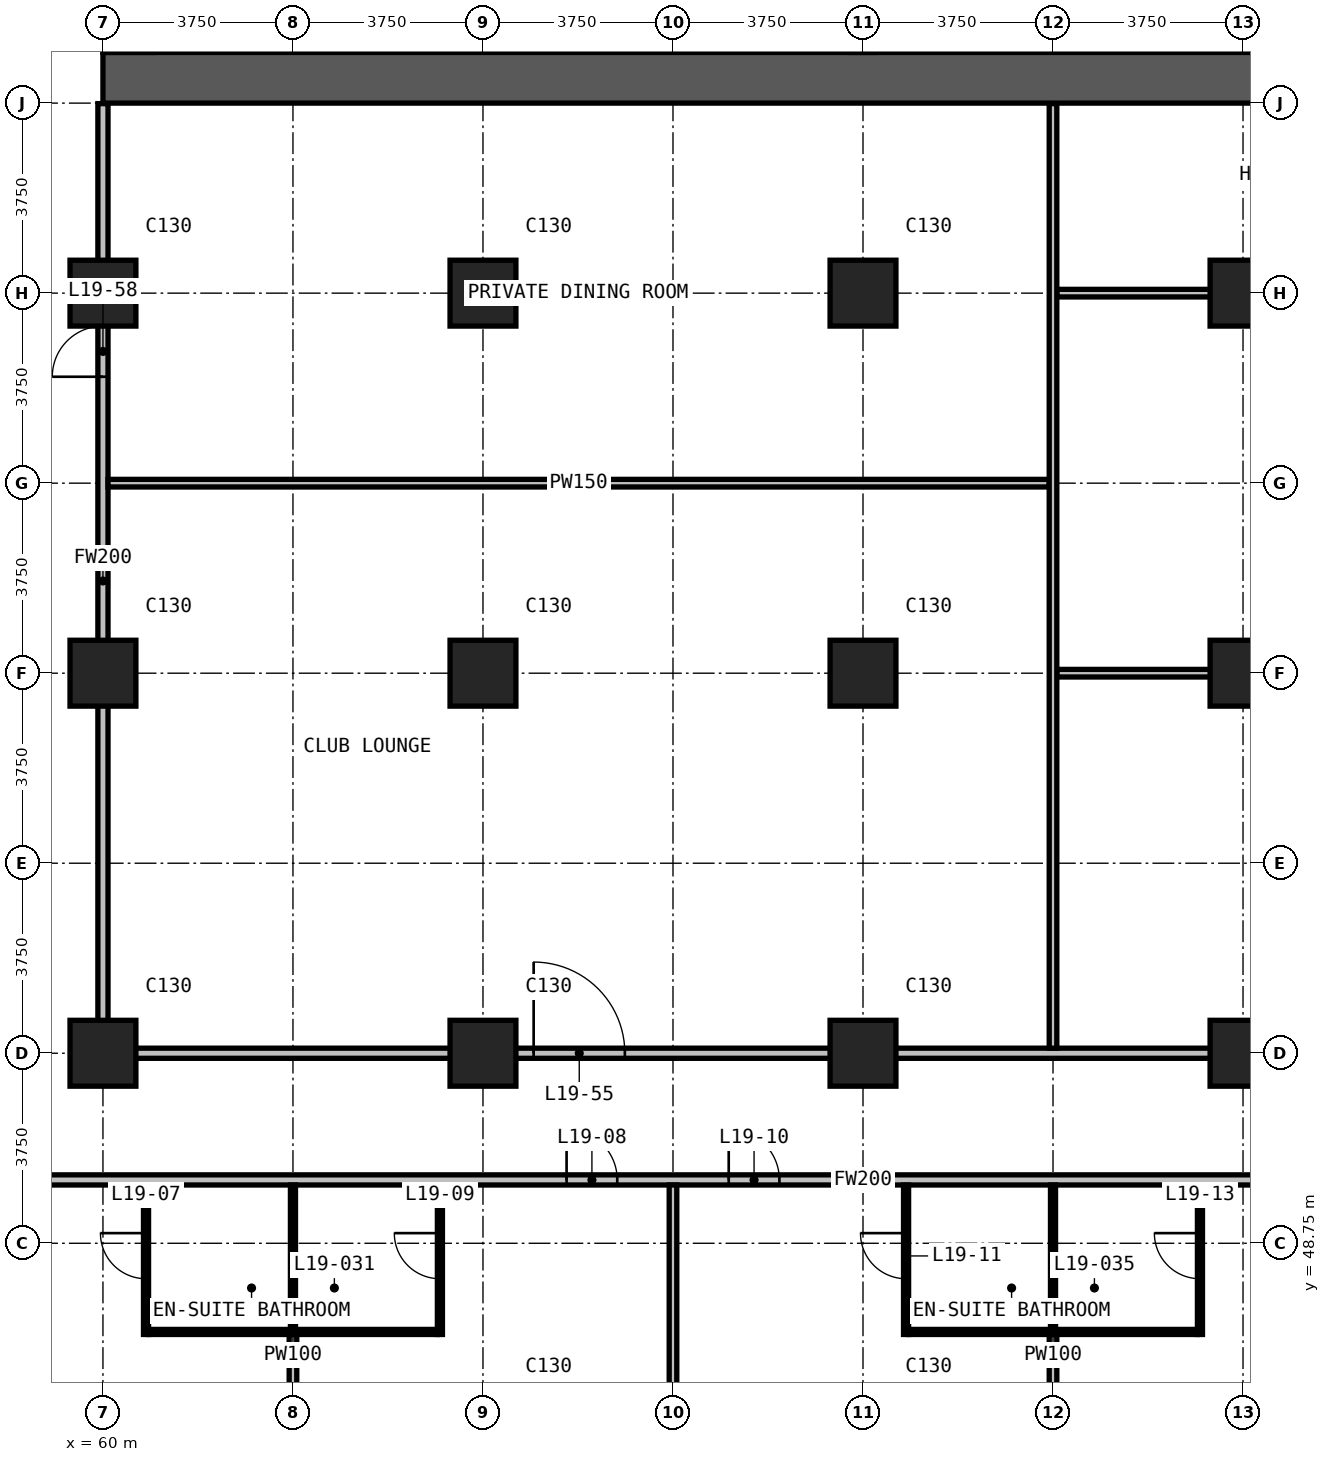
"""IFC4 building model, lengths in metres.
Left out: names, types, materials, properties, quantities, classifications, styles, units other than length and angle.
Written with IfcOpenShell. Run it as: python <this file> out.ifc"""

import sys

from ifc_helpers import new_model, si_unit, direction, frame, frame_2d, origin, origin_2d, place, context, subcontext, project, spatial, rectangle, extrude, element, fill, save


model = new_model("IFC4")
c1 = context("Model", 3, precision=1e-05, world=origin(), true_north=direction((0.0, 1.0)))
c2 = subcontext(c1, "Body", "Model", "MODEL_VIEW")
j1 = project(units=[si_unit("LENGTHUNIT", "METRE"), si_unit("PLANEANGLEUNIT", "RADIAN")], contexts=[c1])
p1 = place(None, origin())
s1 = spatial("IfcSite", under=j1, at=p1, CompositionType="ELEMENT")
p2 = place(p1, origin())
s2 = spatial("IfcBuilding", under=s1, at=p2, CompositionType="ELEMENT")
p3 = place(p2, frame((0.0, 0.0, 82.4)))
s3 = spatial("IfcBuildingStorey", under=s2, at=p3, CompositionType="ELEMENT", Elevation=82.4)
for number, where, z_axis, x_axis in (
    (1, (60.0, 52.5, 0.0), (0.0, 0.0, 1.0), (1.0, 0.0, 0.0)),
    (2, (60.0, 60.0, 0.0), (0.0, 0.0, 1.0), (1.0, 0.0, 0.0)),
    (3, (60.0, 67.5, 0.0), (0.0, 0.0, 1.0), (1.0, 0.0, 0.0)),
    (4, (67.5, 52.5, 0.0), (0.0, 0.0, 1.0), (1.0, 0.0, 0.0)),
    (5, (67.5, 60.0, 0.0), (0.0, 0.0, 1.0), (1.0, 0.0, 0.0)),
    (6, (67.5, 67.5, 0.0), (0.0, 0.0, 1.0), (1.0, 0.0, 0.0)),
    (7, (75.0, 52.5, 0.0), (0.0, 0.0, 1.0), (1.0, 0.0, 0.0)),
    (8, (75.0, 60.0, 0.0), (0.0, 0.0, 1.0), (1.0, 0.0, 0.0)),
    (9, (75.0, 67.5, 0.0), (0.0, 0.0, 1.0), (1.0, 0.0, 0.0)),
    (10, (82.5, 52.5, 0.0), (0.0, 0.0, 1.0), (1.0, 0.0, 0.0)),
    (11, (82.5, 60.0, 0.0), (0.0, 0.0, 1.0), (1.0, 0.0, 0.0)),
    (12, (82.5, 67.5, 0.0), (0.0, 0.0, 1.0), (1.0, 0.0, 0.0)),
):
    element("IfcColumn", number, at=place(p3, frame(where, z_axis=z_axis, x_axis=x_axis)), inside=s3, PredefinedType="COLUMN", context=c2, shape_type="SweptSolid", body=[
        extrude(rectangle(XDim=1.3, YDim=1.3, at=origin_2d()), origin(), (0.0, 0.0, 1.0), 3.3),
    ])
p4 = place(p3, frame((60.0, 71.75, 0.0), z_axis=(0.0, 0.0, 1.0), x_axis=(1.0, 0.0, 0.0)))
e13 = element("IfcWall", 13, at=p4, inside=s3, PredefinedType="SHEAR", context=c2, shape_type="SweptSolid", body=[
    extrude(rectangle(XDim=30.0, YDim=1.0, at=frame_2d((15.0, 0.0))), origin(), (0.0, 0.0, 1.0), 3.3),
])
p5 = place(p3, frame((51.735, 50.0, 0.0), z_axis=(0.0, 0.0, 1.0), x_axis=(1.0, 0.0, 0.0)))
e14 = element("IfcWall", 14, at=p5, inside=s3, PredefinedType="PARTITIONING", context=c2, shape_type="SweptSolid", body=[
    extrude(rectangle(XDim=46.53, YDim=0.2, at=frame_2d((23.265, 0.0))), origin(), (0.0, 0.0, 1.0), 3.0),
])
p6 = place(p5, frame((5.615, 0.0, 0.0)))
e15 = element("IfcOpeningElement", 15, at=p6, cuts=e14, PredefinedType="OPENING", context=c2, shape_type="SweptSolid", body=[
    extrude(rectangle(XDim=1.0, YDim=2.2, at=frame_2d((0.5, 1.1))), frame((0.0, 0.11, 0.0), z_axis=(0.0, -1.0, 0.0), x_axis=(1.0, 0.0, 0.0)), (0.0, 0.0, 1.0), 0.22),
])
p7 = place(p5, frame((17.415, 0.0, 0.0)))
e16 = element("IfcOpeningElement", 16, at=p7, cuts=e14, PredefinedType="OPENING", context=c2, shape_type="SweptSolid", body=[
    extrude(rectangle(XDim=1.0, YDim=2.2, at=frame_2d((0.5, 1.1))), frame((0.0, 0.11, 0.0), z_axis=(0.0, -1.0, 0.0), x_axis=(1.0, 0.0, 0.0)), (0.0, 0.0, 1.0), 0.22),
])
p8 = place(p5, frame((20.615, 0.0, 0.0)))
e17 = element("IfcOpeningElement", 17, at=p8, cuts=e14, PredefinedType="OPENING", context=c2, shape_type="SweptSolid", body=[
    extrude(rectangle(XDim=1.0, YDim=2.2, at=frame_2d((0.5, 1.1))), frame((0.0, 0.11, 0.0), z_axis=(0.0, -1.0, 0.0), x_axis=(1.0, 0.0, 0.0)), (0.0, 0.0, 1.0), 0.22),
])
p9 = place(p5, frame((32.415, 0.0, 0.0)))
e18 = element("IfcOpeningElement", 18, at=p9, cuts=e14, PredefinedType="OPENING", context=c2, shape_type="SweptSolid", body=[
    extrude(rectangle(XDim=1.0, YDim=2.2, at=frame_2d((0.5, 1.1))), frame((0.0, 0.11, 0.0), z_axis=(0.0, -1.0, 0.0), x_axis=(1.0, 0.0, 0.0)), (0.0, 0.0, 1.0), 0.22),
])
p10 = place(p5, frame((35.615, 0.0, 0.0)))
e19 = element("IfcOpeningElement", 19, at=p10, cuts=e14, PredefinedType="OPENING", context=c2, shape_type="SweptSolid", body=[
    extrude(rectangle(XDim=1.0, YDim=2.2, at=frame_2d((0.5, 1.1))), frame((0.0, 0.11, 0.0), z_axis=(0.0, -1.0, 0.0), x_axis=(1.0, 0.0, 0.0)), (0.0, 0.0, 1.0), 0.22),
])
p11 = place(p5, frame((1.8, 0.0, 0.0)))
e20 = element("IfcOpeningElement", 20, at=p11, cuts=e14, PredefinedType="OPENING", context=c2, shape_type="SweptSolid", body=[
    extrude(rectangle(XDim=0.9, YDim=2.2, at=frame_2d((0.45, 1.1))), frame((0.0, 0.11, 0.0), z_axis=(0.0, -1.0, 0.0), x_axis=(1.0, 0.0, 0.0)), (0.0, 0.0, 1.0), 0.22),
])
p12 = place(p5, frame((43.815, 0.0, 0.0)))
e21 = element("IfcOpeningElement", 21, at=p12, cuts=e14, PredefinedType="OPENING", context=c2, shape_type="SweptSolid", body=[
    extrude(rectangle(XDim=0.9, YDim=2.2, at=frame_2d((0.45, 1.1))), frame((0.0, 0.11, 0.0), z_axis=(0.0, -1.0, 0.0), x_axis=(1.0, 0.0, 0.0)), (0.0, 0.0, 1.0), 0.22),
])
p13 = place(p3, frame((60.1, 52.5, 0.0), z_axis=(0.0, 0.0, 1.0), x_axis=(1.0, 0.0, 0.0)))
e22 = element("IfcWall", 22, at=p13, inside=s3, PredefinedType="PARTITIONING", context=c2, shape_type="SweptSolid", body=[
    extrude(rectangle(XDim=29.8, YDim=0.2, at=frame_2d((14.9, 0.0))), origin(), (0.0, 0.0, 1.0), 3.0),
])
p14 = place(p13, frame((8.4, 0.0, 0.0)))
e23 = element("IfcOpeningElement", 23, at=p14, cuts=e22, PredefinedType="OPENING", context=c2, shape_type="SweptSolid", body=[
    extrude(rectangle(XDim=1.8, YDim=2.2, at=frame_2d((0.9, 1.1))), frame((0.0, 0.11, 0.0), z_axis=(0.0, -1.0, 0.0), x_axis=(1.0, 0.0, 0.0)), (0.0, 0.0, 1.0), 0.22),
])
p15 = place(p13, frame((23.75, 0.0, 0.0)))
e24 = element("IfcOpeningElement", 24, at=p15, cuts=e22, PredefinedType="OPENING", context=c2, shape_type="SweptSolid", body=[
    extrude(rectangle(XDim=0.9, YDim=2.2, at=frame_2d((0.45, 1.1))), frame((0.0, 0.11, 0.0), z_axis=(0.0, -1.0, 0.0), x_axis=(1.0, 0.0, 0.0)), (0.0, 0.0, 1.0), 0.22),
])
p16 = place(p3, frame((60.0, 52.4, 0.0), z_axis=(0.0, 0.0, 1.0), x_axis=(0.0, 1.0, 0.0)))
e25 = element("IfcWall", 25, at=p16, inside=s3, PredefinedType="PARTITIONING", context=c2, shape_type="SweptSolid", body=[
    extrude(rectangle(XDim=18.84, YDim=0.2, at=frame_2d((9.42, 0.0))), origin(), (0.0, 0.0, 1.0), 3.0),
])
p17 = place(p16, frame((13.45, 0.0, 0.0)))
e26 = element("IfcOpeningElement", 26, at=p17, cuts=e25, PredefinedType="OPENING", context=c2, shape_type="SweptSolid", body=[
    extrude(rectangle(XDim=1.0, YDim=2.2, at=frame_2d((0.5, 1.1))), frame((0.0, 0.11, 0.0), z_axis=(0.0, -1.0, 0.0), x_axis=(1.0, 0.0, 0.0)), (0.0, 0.0, 1.0), 0.22),
])
p18 = place(p3, frame((78.825, 60.0, 0.0), z_axis=(0.0, 0.0, 1.0), x_axis=(1.0, 0.0, 0.0)))
e27 = element("IfcWall", 27, at=p18, inside=s3, PredefinedType="PARTITIONING", context=c2, shape_type="SweptSolid", body=[
    extrude(rectangle(XDim=11.075, YDim=0.15, at=frame_2d((5.538, 0.0))), origin(), (0.0, 0.0, 1.0), 3.0),
])
p19 = place(p3, frame((60.1, 63.75, 0.0), z_axis=(0.0, 0.0, 1.0), x_axis=(1.0, 0.0, 0.0)))
e28 = element("IfcWall", 28, at=p19, inside=s3, PredefinedType="PARTITIONING", context=c2, shape_type="SweptSolid", body=[
    extrude(rectangle(XDim=18.575, YDim=0.15, at=frame_2d((9.288, 0.0))), origin(), (0.0, 0.0, 1.0), 3.0),
])
p20 = place(p3, frame((78.825, 67.5, 0.0), z_axis=(0.0, 0.0, 1.0), x_axis=(1.0, 0.0, 0.0)))
e29 = element("IfcWall", 29, at=p20, inside=s3, PredefinedType="PARTITIONING", context=c2, shape_type="SweptSolid", body=[
    extrude(rectangle(XDim=11.075, YDim=0.15, at=frame_2d((5.538, 0.0))), origin(), (0.0, 0.0, 1.0), 3.0),
])
p21 = place(p3, frame((63.75, 40.54, 0.0), z_axis=(0.0, 0.0, 1.0), x_axis=(0.0, 1.0, 0.0)))
e30 = element("IfcWall", 30, at=p21, inside=s3, PredefinedType="PARTITIONING", context=c2, shape_type="SweptSolid", body=[
    extrude(rectangle(XDim=6.41, YDim=0.15, at=frame_2d((3.205, 0.0))), origin(), (0.0, 0.0, 1.0), 3.0),
])
p22 = place(p3, frame((71.25, 40.54, 0.0), z_axis=(0.0, 0.0, 1.0), x_axis=(0.0, 1.0, 0.0)))
e31 = element("IfcWall", 31, at=p22, inside=s3, PredefinedType="PARTITIONING", context=c2, shape_type="SweptSolid", body=[
    extrude(rectangle(XDim=9.36, YDim=0.15, at=frame_2d((4.68, 0.0))), origin(), (0.0, 0.0, 1.0), 3.0),
])
p23 = place(p3, frame((78.75, 40.485, 0.0), z_axis=(0.0, 0.0, 1.0), x_axis=(0.0, 1.0, 0.0)))
e32 = element("IfcWall", 32, at=p23, inside=s3, PredefinedType="PARTITIONING", context=c2, shape_type="SweptSolid", body=[
    extrude(rectangle(XDim=6.465, YDim=0.15, at=frame_2d((3.232, 0.0))), origin(), (0.0, 0.0, 1.0), 3.0),
])
p24 = place(p3, frame((78.75, 52.6, 0.0), z_axis=(0.0, 0.0, 1.0), x_axis=(0.0, 1.0, 0.0)))
e33 = element("IfcWall", 33, at=p24, inside=s3, PredefinedType="PARTITIONING", context=c2, shape_type="SweptSolid", body=[
    extrude(rectangle(XDim=18.64, YDim=0.15, at=frame_2d((9.32, 0.0))), origin(), (0.0, 0.0, 1.0), 3.0),
])
for number, where, z_axis, x_axis in (
    (34, (60.9, 47.0, 0.0), (0.0, 0.0, 1.0), (1.0, 0.0, 0.0)),
    (35, (75.9, 47.0, 0.0), (0.0, 0.0, 1.0), (1.0, 0.0, 0.0)),
):
    element("IfcWall", number, at=place(p3, frame(where, z_axis=z_axis, x_axis=x_axis)), inside=s3, PredefinedType="PARTITIONING", context=c2, shape_type="SweptSolid", body=[
        extrude(rectangle(XDim=5.7, YDim=0.1, at=frame_2d((2.85, 0.0))), origin(), (0.0, 0.0, 1.0), 3.0),
    ])
p25 = place(p3, frame((60.85, 46.95, 0.0), z_axis=(0.0, 0.0, 1.0), x_axis=(0.0, 1.0, 0.0)))
e36 = element("IfcWall", 36, at=p25, inside=s3, PredefinedType="PARTITIONING", context=c2, shape_type="SweptSolid", body=[
    extrude(rectangle(XDim=2.95, YDim=0.1, at=frame_2d((1.475, 0.0))), origin(), (0.0, 0.0, 1.0), 3.0),
])
p26 = place(p25, frame((1.1, 0.0, 0.0)))
e37 = element("IfcOpeningElement", 37, at=p26, cuts=e36, PredefinedType="OPENING", context=c2, shape_type="SweptSolid", body=[
    extrude(rectangle(XDim=0.9, YDim=2.2, at=frame_2d((0.45, 1.1))), frame((0.0, 0.06, 0.0), z_axis=(0.0, -1.0, 0.0), x_axis=(1.0, 0.0, 0.0)), (0.0, 0.0, 1.0), 0.12),
])
p27 = place(p3, frame((63.75, 47.05, 0.0), z_axis=(0.0, 0.0, 1.0), x_axis=(0.0, 1.0, 0.0)))
e38 = element("IfcWall", 38, at=p27, inside=s3, PredefinedType="PARTITIONING", context=c2, shape_type="SweptSolid", body=[
    extrude(rectangle(XDim=2.85, YDim=0.1, at=frame_2d((1.425, 0.0))), origin(), (0.0, 0.0, 1.0), 3.0),
])
p28 = place(p3, frame((66.65, 46.95, 0.0), z_axis=(0.0, 0.0, 1.0), x_axis=(0.0, 1.0, 0.0)))
e39 = element("IfcWall", 39, at=p28, inside=s3, PredefinedType="PARTITIONING", context=c2, shape_type="SweptSolid", body=[
    extrude(rectangle(XDim=2.95, YDim=0.1, at=frame_2d((1.475, 0.0))), origin(), (0.0, 0.0, 1.0), 3.0),
])
p29 = place(p28, frame((1.1, 0.0, 0.0)))
e40 = element("IfcOpeningElement", 40, at=p29, cuts=e39, PredefinedType="OPENING", context=c2, shape_type="SweptSolid", body=[
    extrude(rectangle(XDim=0.9, YDim=2.2, at=frame_2d((0.45, 1.1))), frame((0.0, 0.06, 0.0), z_axis=(0.0, -1.0, 0.0), x_axis=(1.0, 0.0, 0.0)), (0.0, 0.0, 1.0), 0.12),
])
p30 = place(p3, frame((75.85, 46.95, 0.0), z_axis=(0.0, 0.0, 1.0), x_axis=(0.0, 1.0, 0.0)))
e41 = element("IfcWall", 41, at=p30, inside=s3, PredefinedType="PARTITIONING", context=c2, shape_type="SweptSolid", body=[
    extrude(rectangle(XDim=2.95, YDim=0.1, at=frame_2d((1.475, 0.0))), origin(), (0.0, 0.0, 1.0), 3.0),
])
p31 = place(p30, frame((1.1, 0.0, 0.0)))
e42 = element("IfcOpeningElement", 42, at=p31, cuts=e41, PredefinedType="OPENING", context=c2, shape_type="SweptSolid", body=[
    extrude(rectangle(XDim=0.9, YDim=2.2, at=frame_2d((0.45, 1.1))), frame((0.0, 0.06, 0.0), z_axis=(0.0, -1.0, 0.0), x_axis=(1.0, 0.0, 0.0)), (0.0, 0.0, 1.0), 0.12),
])
p32 = place(p3, frame((78.75, 47.05, 0.0), z_axis=(0.0, 0.0, 1.0), x_axis=(0.0, 1.0, 0.0)))
e43 = element("IfcWall", 43, at=p32, inside=s3, PredefinedType="PARTITIONING", context=c2, shape_type="SweptSolid", body=[
    extrude(rectangle(XDim=2.85, YDim=0.1, at=frame_2d((1.425, 0.0))), origin(), (0.0, 0.0, 1.0), 3.0),
])
p33 = place(p3, frame((81.65, 46.95, 0.0), z_axis=(0.0, 0.0, 1.0), x_axis=(0.0, 1.0, 0.0)))
e44 = element("IfcWall", 44, at=p33, inside=s3, PredefinedType="PARTITIONING", context=c2, shape_type="SweptSolid", body=[
    extrude(rectangle(XDim=2.95, YDim=0.1, at=frame_2d((1.475, 0.0))), origin(), (0.0, 0.0, 1.0), 3.0),
])
p34 = place(p33, frame((1.1, 0.0, 0.0)))
e45 = element("IfcOpeningElement", 45, at=p34, cuts=e44, PredefinedType="OPENING", context=c2, shape_type="SweptSolid", body=[
    extrude(rectangle(XDim=0.9, YDim=2.2, at=frame_2d((0.45, 1.1))), frame((0.0, 0.06, 0.0), z_axis=(0.0, -1.0, 0.0), x_axis=(1.0, 0.0, 0.0)), (0.0, 0.0, 1.0), 0.12),
])
p35 = place(p26, origin())
e46 = element("IfcDoor", 46, at=p35, inside=s3, OperationType="SINGLE_SWING_RIGHT", PredefinedType="DOOR", context=c2, shape_type="SweptSolid", body=[
    extrude(rectangle(XDim=0.9, YDim=2.2, at=frame_2d((0.45, 1.1))), frame((0.0, 0.025, 0.0), z_axis=(0.0, -1.0, 0.0), x_axis=(1.0, 0.0, 0.0)), (0.0, 0.0, 1.0), 0.05),
])
fill(e37, e46)
p36 = place(p7, origin())
e47 = element("IfcDoor", 47, at=p36, inside=s3, OperationType="SINGLE_SWING_LEFT", PredefinedType="DOOR", context=c2, shape_type="SweptSolid", body=[
    extrude(rectangle(XDim=1.0, YDim=2.2, at=frame_2d((0.5, 1.1))), frame((0.0, 0.025, 0.0), z_axis=(0.0, -1.0, 0.0), x_axis=(1.0, 0.0, 0.0)), (0.0, 0.0, 1.0), 0.05),
])
fill(e16, e47)
p37 = place(p29, origin())
e48 = element("IfcDoor", 48, at=p37, inside=s3, OperationType="SINGLE_SWING_RIGHT", PredefinedType="DOOR", context=c2, shape_type="SweptSolid", body=[
    extrude(rectangle(XDim=0.9, YDim=2.2, at=frame_2d((0.45, 1.1))), frame((0.0, 0.025, 0.0), z_axis=(0.0, -1.0, 0.0), x_axis=(1.0, 0.0, 0.0)), (0.0, 0.0, 1.0), 0.05),
])
fill(e40, e48)
p38 = place(p8, origin())
e49 = element("IfcDoor", 49, at=p38, inside=s3, OperationType="SINGLE_SWING_RIGHT", PredefinedType="DOOR", context=c2, shape_type="SweptSolid", body=[
    extrude(rectangle(XDim=1.0, YDim=2.2, at=frame_2d((0.5, 1.1))), frame((0.0, 0.025, 0.0), z_axis=(0.0, -1.0, 0.0), x_axis=(1.0, 0.0, 0.0)), (0.0, 0.0, 1.0), 0.05),
])
fill(e17, e49)
p39 = place(p31, origin())
e50 = element("IfcDoor", 50, at=p39, inside=s3, OperationType="SINGLE_SWING_RIGHT", PredefinedType="DOOR", context=c2, shape_type="SweptSolid", body=[
    extrude(rectangle(XDim=0.9, YDim=2.2, at=frame_2d((0.45, 1.1))), frame((0.0, 0.025, 0.0), z_axis=(0.0, -1.0, 0.0), x_axis=(1.0, 0.0, 0.0)), (0.0, 0.0, 1.0), 0.05),
])
fill(e42, e50)
p40 = place(p34, origin())
e51 = element("IfcDoor", 51, at=p40, inside=s3, OperationType="SINGLE_SWING_RIGHT", PredefinedType="DOOR", context=c2, shape_type="SweptSolid", body=[
    extrude(rectangle(XDim=0.9, YDim=2.2, at=frame_2d((0.45, 1.1))), frame((0.0, 0.025, 0.0), z_axis=(0.0, -1.0, 0.0), x_axis=(1.0, 0.0, 0.0)), (0.0, 0.0, 1.0), 0.05),
])
fill(e45, e51)
p41 = place(p14, origin())
e52 = element("IfcDoor", 52, at=p41, inside=s3, OperationType="DOUBLE_DOOR_SINGLE_SWING", PredefinedType="DOOR", context=c2, shape_type="SweptSolid", body=[
    extrude(rectangle(XDim=1.8, YDim=2.2, at=frame_2d((0.9, 1.1))), frame((0.0, 0.025, 0.0), z_axis=(0.0, -1.0, 0.0), x_axis=(1.0, 0.0, 0.0)), (0.0, 0.0, 1.0), 0.05),
])
fill(e23, e52)
p42 = place(p17, origin())
e53 = element("IfcDoor", 53, at=p42, inside=s3, OperationType="SINGLE_SWING_RIGHT", PredefinedType="DOOR", context=c2, shape_type="SweptSolid", body=[
    extrude(rectangle(XDim=1.0, YDim=2.2, at=frame_2d((0.5, 1.1))), frame((0.0, 0.025, 0.0), z_axis=(0.0, -1.0, 0.0), x_axis=(1.0, 0.0, 0.0)), (0.0, 0.0, 1.0), 0.05),
])
fill(e26, e53)
save(model, sys.argv[1])
